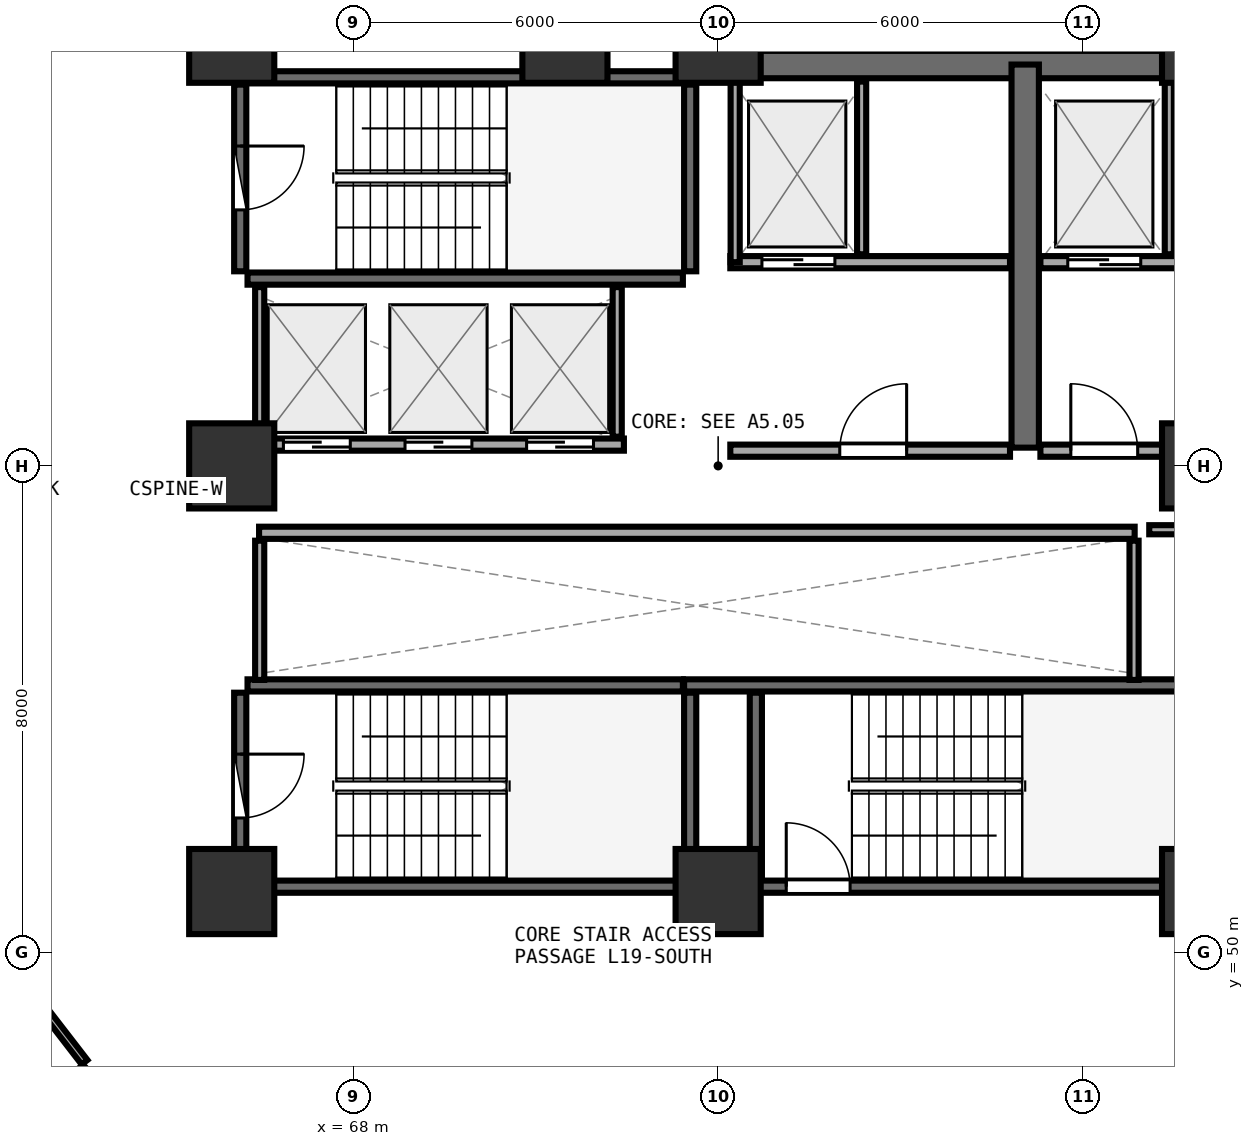
"""IFC4 building model, lengths in metres.
Left out: names, types, materials, properties, quantities, classifications, styles, units other than length and angle.
Written with IfcOpenShell. Run it as: python <this file> out.ifc"""

import sys

from ifc_helpers import new_model, si_unit, direction, frame, frame_2d, origin, origin_2d, place, context, subcontext, project, spatial, rectangle, extrude, element, fill, save


model = new_model("IFC4")
c1 = context("Model", 3, precision=1e-05, world=origin(), true_north=direction((0.0, 1.0)))
c2 = subcontext(c1, "Body", "Model", "MODEL_VIEW")
j1 = project(units=[si_unit("LENGTHUNIT", "METRE"), si_unit("PLANEANGLEUNIT", "RADIAN")], contexts=[c1])
p1 = place(None, origin())
s1 = spatial("IfcSite", under=j1, at=p1, CompositionType="ELEMENT")
p2 = place(p1, origin())
s2 = spatial("IfcBuilding", under=s1, at=p2, CompositionType="ELEMENT")
p3 = place(p2, frame((0.0, 0.0, 76.35)))
s3 = spatial("IfcBuildingStorey", under=s2, at=p3, CompositionType="ELEMENT", Elevation=76.35)
for number, where, z_axis, x_axis in (
    (1, (66.0, 51.0, 0.0), (0.0, 0.0, 1.0), (1.0, 0.0, 0.0)),
    (2, (74.0, 51.0, 0.0), (0.0, 0.0, 1.0), (1.0, 0.0, 0.0)),
    (3, (82.0, 51.0, 0.0), (0.0, 0.0, 1.0), (1.0, 0.0, 0.0)),
    (4, (82.0, 58.0, 0.0), (0.0, 0.0, 1.0), (1.0, 0.0, 0.0)),
    (5, (82.0, 65.0, 0.0), (0.0, 0.0, 1.0), (1.0, 0.0, 0.0)),
    (6, (74.0, 65.0, 0.0), (0.0, 0.0, 1.0), (1.0, 0.0, 0.0)),
    (7, (71.48, 65.0, 0.0), (0.0, 0.0, 1.0), (1.0, 0.0, 0.0)),
    (8, (66.0, 65.0, 0.0), (0.0, 0.0, 1.0), (1.0, 0.0, 0.0)),
    (9, (66.0, 58.0, 0.0), (0.0, 0.0, 1.0), (1.0, 0.0, 0.0)),
):
    element("IfcColumn", number, at=place(p3, frame(where, z_axis=z_axis, x_axis=x_axis)), inside=s3, PredefinedType="PILASTER", context=c2, shape_type="SweptSolid", body=[
        extrude(rectangle(XDim=1.4, YDim=1.4, at=origin_2d()), origin(), (0.0, 0.0, 1.0), 3.75),
    ])
p4 = place(p3, frame((66.26, 61.08, 0.0), z_axis=(0.0, 0.0, 1.0), x_axis=(1.0, 0.0, 0.0)))
e10 = element("IfcWall", 10, at=p4, inside=s3, PredefinedType="SHEAR", context=c2, shape_type="SweptSolid", body=[
    extrude(rectangle(XDim=7.16, YDim=0.2, at=frame_2d((3.58, 0.0))), origin(), (0.0, 0.0, 1.0), 3.49),
])
p5 = place(p3, frame((73.54, 61.2, 0.0), z_axis=(0.0, 0.0, 1.0), x_axis=(0.0, 1.0, 0.0)))
e11 = element("IfcWall", 11, at=p5, inside=s3, PredefinedType="SHEAR", context=c2, shape_type="SweptSolid", body=[
    extrude(rectangle(XDim=3.07, YDim=0.2, at=frame_2d((1.535, 0.0))), origin(), (0.0, 0.0, 1.0), 3.49),
])
p6 = place(p3, frame((73.42, 64.39, 0.0), z_axis=(0.0, 0.0, 1.0), x_axis=(-1.0, 0.0, 0.0)))
e12 = element("IfcWall", 12, at=p6, inside=s3, PredefinedType="SHEAR", context=c2, shape_type="SweptSolid", body=[
    extrude(rectangle(XDim=7.16, YDim=0.2, at=frame_2d((3.58, 0.0))), origin(), (0.0, 0.0, 1.0), 3.49),
])
p7 = place(p3, frame((66.14, 64.27, 0.0), z_axis=(0.0, 0.0, 1.0), x_axis=(0.0, -1.0, 0.0)))
e13 = element("IfcWall", 13, at=p7, inside=s3, PredefinedType="SHEAR", context=c2, shape_type="SweptSolid", body=[
    extrude(rectangle(XDim=3.07, YDim=0.2, at=frame_2d((1.535, 0.0))), origin(), (0.0, 0.0, 1.0), 3.49),
])
p8 = place(p7, frame((1.01, 0.0, 0.0)))
e14 = element("IfcOpeningElement", 14, at=p8, cuts=e13, PredefinedType="OPENING", context=c2, shape_type="SweptSolid", body=[
    extrude(rectangle(XDim=1.05, YDim=2.1, at=frame_2d((0.525, 1.05))), frame((0.0, 0.11, 0.0), z_axis=(0.0, -1.0, 0.0), x_axis=(1.0, 0.0, 0.0)), (0.0, 0.0, 1.0), 0.22),
])
p9 = place(p3, frame((74.0, 51.08, 0.0), z_axis=(0.0, 0.0, 1.0), x_axis=(1.0, 0.0, 0.0)))
e15 = element("IfcWall", 15, at=p9, inside=s3, PredefinedType="SHEAR", context=c2, shape_type="SweptSolid", body=[
    extrude(rectangle(XDim=7.9, YDim=0.2, at=frame_2d((3.95, 0.0))), origin(), (0.0, 0.0, 1.0), 3.49),
])
p10 = place(p9, frame((1.12, 0.0, 0.0)))
e16 = element("IfcOpeningElement", 16, at=p10, cuts=e15, PredefinedType="OPENING", context=c2, shape_type="SweptSolid", body=[
    extrude(rectangle(XDim=1.05, YDim=2.1, at=frame_2d((0.525, 1.05))), frame((0.0, 0.11, 0.0), z_axis=(0.0, -1.0, 0.0), x_axis=(1.0, 0.0, 0.0)), (0.0, 0.0, 1.0), 0.22),
])
p11 = place(p3, frame((81.9, 54.39, 0.0), z_axis=(0.0, 0.0, 1.0), x_axis=(-1.0, 0.0, 0.0)))
e17 = element("IfcWall", 17, at=p11, inside=s3, PredefinedType="SHEAR", context=c2, shape_type="SweptSolid", body=[
    extrude(rectangle(XDim=8.46, YDim=0.2, at=frame_2d((4.23, 0.0))), origin(), (0.0, 0.0, 1.0), 3.49),
])
p12 = place(p3, frame((74.62, 54.27, 0.0), z_axis=(0.0, 0.0, 1.0), x_axis=(0.0, -1.0, 0.0)))
e18 = element("IfcWall", 18, at=p12, inside=s3, PredefinedType="SHEAR", context=c2, shape_type="SweptSolid", body=[
    extrude(rectangle(XDim=3.07, YDim=0.2, at=frame_2d((1.535, 0.0))), origin(), (0.0, 0.0, 1.0), 3.49),
])
p13 = place(p3, frame((66.26, 51.08, 0.0), z_axis=(0.0, 0.0, 1.0), x_axis=(1.0, 0.0, 0.0)))
e19 = element("IfcWall", 19, at=p13, inside=s3, PredefinedType="SHEAR", context=c2, shape_type="SweptSolid", body=[
    extrude(rectangle(XDim=7.16, YDim=0.2, at=frame_2d((3.58, 0.0))), origin(), (0.0, 0.0, 1.0), 3.49),
])
p14 = place(p3, frame((73.54, 51.2, 0.0), z_axis=(0.0, 0.0, 1.0), x_axis=(0.0, 1.0, 0.0)))
e20 = element("IfcWall", 20, at=p14, inside=s3, PredefinedType="SHEAR", context=c2, shape_type="SweptSolid", body=[
    extrude(rectangle(XDim=3.07, YDim=0.2, at=frame_2d((1.535, 0.0))), origin(), (0.0, 0.0, 1.0), 3.49),
])
p15 = place(p3, frame((73.42, 54.39, 0.0), z_axis=(0.0, 0.0, 1.0), x_axis=(-1.0, 0.0, 0.0)))
e21 = element("IfcWall", 21, at=p15, inside=s3, PredefinedType="SHEAR", context=c2, shape_type="SweptSolid", body=[
    extrude(rectangle(XDim=7.16, YDim=0.2, at=frame_2d((3.58, 0.0))), origin(), (0.0, 0.0, 1.0), 3.49),
])
p16 = place(p3, frame((66.14, 54.27, 0.0), z_axis=(0.0, 0.0, 1.0), x_axis=(0.0, -1.0, 0.0)))
e22 = element("IfcWall", 22, at=p16, inside=s3, PredefinedType="SHEAR", context=c2, shape_type="SweptSolid", body=[
    extrude(rectangle(XDim=3.07, YDim=0.2, at=frame_2d((1.535, 0.0))), origin(), (0.0, 0.0, 1.0), 3.49),
])
p17 = place(p16, frame((1.01, 0.0, 0.0)))
e23 = element("IfcOpeningElement", 23, at=p17, cuts=e22, PredefinedType="OPENING", context=c2, shape_type="SweptSolid", body=[
    extrude(rectangle(XDim=1.05, YDim=2.1, at=frame_2d((0.525, 1.05))), frame((0.0, 0.11, 0.0), z_axis=(0.0, -1.0, 0.0), x_axis=(1.0, 0.0, 0.0)), (0.0, 0.0, 1.0), 0.22),
])
p18 = place(p3, frame((74.0, 64.6, 0.0), z_axis=(0.0, 0.0, 1.0), x_axis=(1.0, 0.0, 0.0)))
e24 = element("IfcWall", 24, at=p18, inside=s3, PredefinedType="SHEAR", context=c2, shape_type="SweptSolid", body=[
    extrude(rectangle(XDim=8.0, YDim=0.45, at=frame_2d((4.0, 0.0))), origin(), (0.0, 0.0, 1.0), 3.49),
])
p19 = place(p3, frame((79.05, 58.3, 0.0), z_axis=(0.0, 0.0, 1.0), x_axis=(0.0, 1.0, 0.0)))
e25 = element("IfcWall", 25, at=p19, inside=s3, PredefinedType="SHEAR", context=c2, shape_type="SweptSolid", body=[
    extrude(rectangle(XDim=6.3, YDim=0.45, at=frame_2d((3.15, 0.0))), origin(), (0.0, 0.0, 1.0), 3.49),
])
p20 = place(p3, frame((74.2, 61.35, 0.0), z_axis=(0.0, 0.0, 1.0), x_axis=(1.0, 0.0, 0.0)))
e26 = element("IfcWall", 26, at=p20, inside=s3, PredefinedType="SOLIDWALL", context=c2, shape_type="SweptSolid", body=[
    extrude(rectangle(XDim=4.6, YDim=0.2, at=frame_2d((2.3, 0.0))), origin(), (0.0, 0.0, 1.0), 3.48),
])
p21 = place(p20, frame((0.52, 0.0, 0.0)))
e27 = element("IfcOpeningElement", 27, at=p21, cuts=e26, PredefinedType="OPENING", context=c2, shape_type="SweptSolid", body=[
    extrude(rectangle(XDim=1.2, YDim=2.15, at=frame_2d((0.6, 1.075))), frame((0.0, 0.11, 0.0), z_axis=(0.0, -1.0, 0.0), x_axis=(1.0, 0.0, 0.0)), (0.0, 0.0, 1.0), 0.22),
])
p22 = place(p3, frame((74.28, 61.35, 0.0), z_axis=(0.0, 0.0, 1.0), x_axis=(0.0, 1.0, 0.0)))
e28 = element("IfcWall", 28, at=p22, inside=s3, PredefinedType="PARTITIONING", context=c2, shape_type="SweptSolid", body=[
    extrude(rectangle(XDim=2.97, YDim=0.15, at=frame_2d((1.485, 0.0))), origin(), (0.0, 0.0, 1.0), 3.48),
])
p23 = place(p3, frame((76.36, 61.48, 0.0), z_axis=(0.0, 0.0, 1.0), x_axis=(0.0, 1.0, 0.0)))
e29 = element("IfcWall", 29, at=p23, inside=s3, PredefinedType="PARTITIONING", context=c2, shape_type="SweptSolid", body=[
    extrude(rectangle(XDim=2.84, YDim=0.15, at=frame_2d((1.42, 0.0))), origin(), (0.0, 0.0, 1.0), 3.48),
])
p24 = place(p3, frame((79.3, 61.35, 0.0), z_axis=(0.0, 0.0, 1.0), x_axis=(1.0, 0.0, 0.0)))
e30 = element("IfcWall", 30, at=p24, inside=s3, PredefinedType="SOLIDWALL", context=c2, shape_type="SweptSolid", body=[
    extrude(rectangle(XDim=4.0, YDim=0.2, at=frame_2d((2.0, 0.0))), origin(), (0.0, 0.0, 1.0), 2.775),
])
p25 = place(p24, frame((0.45, 0.0, 0.0)))
e31 = element("IfcOpeningElement", 31, at=p25, cuts=e30, PredefinedType="OPENING", context=c2, shape_type="SweptSolid", body=[
    extrude(rectangle(XDim=1.2, YDim=2.15, at=frame_2d((0.6, 1.075))), frame((0.0, 0.11, 0.0), z_axis=(0.0, -1.0, 0.0), x_axis=(1.0, 0.0, 0.0)), (0.0, 0.0, 1.0), 0.22),
])
p26 = place(p3, frame((81.42, 61.48, 0.0), z_axis=(0.0, 0.0, 1.0), x_axis=(0.0, 1.0, 0.0)))
e32 = element("IfcWall", 32, at=p26, inside=s3, PredefinedType="PARTITIONING", context=c2, shape_type="SweptSolid", body=[
    extrude(rectangle(XDim=2.84, YDim=0.15, at=frame_2d((1.42, 0.0))), origin(), (0.0, 0.0, 1.0), 3.48),
])
p27 = place(p3, frame((74.2, 58.25, 0.0), z_axis=(0.0, 0.0, 1.0), x_axis=(1.0, 0.0, 0.0)))
e33 = element("IfcWall", 33, at=p27, inside=s3, PredefinedType="SOLIDWALL", context=c2, shape_type="SweptSolid", body=[
    extrude(rectangle(XDim=4.6, YDim=0.2, at=frame_2d((2.3, 0.0))), origin(), (0.0, 0.0, 1.0), 3.48),
])
p28 = place(p27, frame((1.8, 0.0, 0.0)))
e34 = element("IfcOpeningElement", 34, at=p28, cuts=e33, PredefinedType="OPENING", context=c2, shape_type="SweptSolid", body=[
    extrude(rectangle(XDim=1.1, YDim=2.1, at=frame_2d((0.55, 1.05))), frame((0.0, 0.11, 0.0), z_axis=(0.0, -1.0, 0.0), x_axis=(1.0, 0.0, 0.0)), (0.0, 0.0, 1.0), 0.22),
])
p29 = place(p3, frame((79.3, 58.25, 0.0), z_axis=(0.0, 0.0, 1.0), x_axis=(1.0, 0.0, 0.0)))
e35 = element("IfcWall", 35, at=p29, inside=s3, PredefinedType="SOLIDWALL", context=c2, shape_type="SweptSolid", body=[
    extrude(rectangle(XDim=4.0, YDim=0.2, at=frame_2d((2.0, 0.0))), origin(), (0.0, 0.0, 1.0), 2.775),
])
p30 = place(p29, frame((0.5, 0.0, 0.0)))
e36 = element("IfcOpeningElement", 36, at=p30, cuts=e35, PredefinedType="OPENING", context=c2, shape_type="SweptSolid", body=[
    extrude(rectangle(XDim=1.1, YDim=2.1, at=frame_2d((0.55, 1.05))), frame((0.0, 0.11, 0.0), z_axis=(0.0, -1.0, 0.0), x_axis=(1.0, 0.0, 0.0)), (0.0, 0.0, 1.0), 0.22),
])
p31 = place(p3, frame((66.45, 58.35, 0.0), z_axis=(0.0, 0.0, 1.0), x_axis=(1.0, 0.0, 0.0)))
e37 = element("IfcWall", 37, at=p31, inside=s3, PredefinedType="SOLIDWALL", context=c2, shape_type="SweptSolid", body=[
    extrude(rectangle(XDim=6.0, YDim=0.2, at=frame_2d((3.0, 0.0))), origin(), (0.0, 0.0, 1.0), 3.48),
])
p32 = place(p31, frame((0.4, 0.0, 0.0)))
e38 = element("IfcOpeningElement", 38, at=p32, cuts=e37, PredefinedType="OPENING", context=c2, shape_type="SweptSolid", body=[
    extrude(rectangle(XDim=1.1, YDim=2.1, at=frame_2d((0.55, 1.05))), frame((0.0, 0.11, 0.0), z_axis=(0.0, -1.0, 0.0), x_axis=(1.0, 0.0, 0.0)), (0.0, 0.0, 1.0), 0.22),
])
p33 = place(p31, frame((2.4, 0.0, 0.0)))
e39 = element("IfcOpeningElement", 39, at=p33, cuts=e37, PredefinedType="OPENING", context=c2, shape_type="SweptSolid", body=[
    extrude(rectangle(XDim=1.1, YDim=2.1, at=frame_2d((0.55, 1.05))), frame((0.0, 0.11, 0.0), z_axis=(0.0, -1.0, 0.0), x_axis=(1.0, 0.0, 0.0)), (0.0, 0.0, 1.0), 0.22),
])
p34 = place(p31, frame((4.4, 0.0, 0.0)))
e40 = element("IfcOpeningElement", 40, at=p34, cuts=e37, PredefinedType="OPENING", context=c2, shape_type="SweptSolid", body=[
    extrude(rectangle(XDim=1.1, YDim=2.1, at=frame_2d((0.55, 1.05))), frame((0.0, 0.11, 0.0), z_axis=(0.0, -1.0, 0.0), x_axis=(1.0, 0.0, 0.0)), (0.0, 0.0, 1.0), 0.22),
])
for number, where, z_axis, x_axis in (
    (41, (66.46, 58.48, 0.0), (0.0, 0.0, 1.0), (0.0, 1.0, 0.0)),
    (42, (72.34, 58.48, 0.0), (0.0, 0.0, 1.0), (0.0, 1.0, 0.0)),
):
    element("IfcWall", number, at=place(p3, frame(where, z_axis=z_axis, x_axis=x_axis)), inside=s3, PredefinedType="PARTITIONING", context=c2, shape_type="SweptSolid", body=[
        extrude(rectangle(XDim=2.46, YDim=0.15, at=frame_2d((1.23, 0.0))), origin(), (0.0, 0.0, 1.0), 3.48),
    ])
p35 = place(p3, frame((66.45, 56.9, 0.0), z_axis=(0.0, 0.0, 1.0), x_axis=(1.0, 0.0, 0.0)))
e43 = element("IfcWall", 43, at=p35, inside=s3, PredefinedType="SOLIDWALL", context=c2, shape_type="SweptSolid", body=[
    extrude(rectangle(XDim=14.4, YDim=0.2, at=frame_2d((7.2, 0.0))), origin(), (0.0, 0.0, 1.0), 3.48),
])
for number, where, z_axis, x_axis in (
    (44, (66.46, 54.48, 0.0), (0.0, 0.0, 1.0), (0.0, 1.0, 0.0)),
    (45, (80.84, 54.48, 0.0), (0.0, 0.0, 1.0), (0.0, 1.0, 0.0)),
):
    element("IfcWall", number, at=place(p3, frame(where, z_axis=z_axis, x_axis=x_axis)), inside=s3, PredefinedType="PARTITIONING", context=c2, shape_type="SweptSolid", body=[
        extrude(rectangle(XDim=2.29, YDim=0.15, at=frame_2d((1.145, 0.0))), origin(), (0.0, 0.0, 1.0), 3.48),
    ])
p36 = place(p3, frame((63.964, 68.131, 0.0), z_axis=(0.0, 0.0, 1.0), x_axis=(-0.639104047727, -0.769120287198, 0.0)))
e46 = element("IfcWall", 46, at=p36, inside=s3, PredefinedType="PARTITIONING", context=c2, shape_type="SweptSolid", body=[
    extrude(rectangle(XDim=5.427, YDim=0.12, at=frame_2d((2.713, 0.0))), origin(), (0.0, 0.0, 1.0), 2.925),
])
p37 = place(p36, frame((2.263, 0.0, 0.0)))
e47 = element("IfcOpeningElement", 47, at=p37, cuts=e46, PredefinedType="OPENING", context=c2, shape_type="SweptSolid", body=[
    extrude(rectangle(XDim=0.9, YDim=2.08, at=frame_2d((0.45, 1.04))), frame((0.0, 0.07, 0.0), z_axis=(0.0, -1.0, 0.0), x_axis=(1.0, 0.0, 0.0)), (0.0, 0.0, 1.0), 0.14),
])
p38 = place(p3, frame((60.275, 52.473, 0.0), z_axis=(0.0, 0.0, 1.0), x_axis=(0.611167326409, -0.791501420801, 0.0)))
e48 = element("IfcWall", 48, at=p38, inside=s3, PredefinedType="PARTITIONING", context=c2, shape_type="SweptSolid", body=[
    extrude(rectangle(XDim=5.407, YDim=0.12, at=frame_2d((2.704, 0.0))), origin(), (0.0, 0.0, 1.0), 2.925),
])
p39 = place(p38, frame((2.254, 0.0, 0.0)))
e49 = element("IfcOpeningElement", 49, at=p39, cuts=e48, PredefinedType="OPENING", context=c2, shape_type="SweptSolid", body=[
    extrude(rectangle(XDim=0.9, YDim=2.08, at=frame_2d((0.45, 1.04))), frame((0.0, 0.07, 0.0), z_axis=(0.0, -1.0, 0.0), x_axis=(1.0, 0.0, 0.0)), (0.0, 0.0, 1.0), 0.14),
])
p40 = place(p3, frame((81.494, 46.198, 0.0), z_axis=(0.0, 0.0, 1.0), x_axis=(0.785315722545, 0.619095482074, 0.0)))
e50 = element("IfcWall", 50, at=p40, inside=s3, PredefinedType="PARTITIONING", context=c2, shape_type="SweptSolid", body=[
    extrude(rectangle(XDim=5.54, YDim=0.12, at=frame_2d((2.77, 0.0))), origin(), (0.0, 0.0, 1.0), 2.925),
])
p41 = place(p40, frame((2.32, 0.0, 0.0)))
e51 = element("IfcOpeningElement", 51, at=p41, cuts=e50, PredefinedType="OPENING", context=c2, shape_type="SweptSolid", body=[
    extrude(rectangle(XDim=0.9, YDim=2.08, at=frame_2d((0.45, 1.04))), frame((0.0, 0.07, 0.0), z_axis=(0.0, -1.0, 0.0), x_axis=(1.0, 0.0, 0.0)), (0.0, 0.0, 1.0), 0.14),
])
p42 = place(p3, frame((82.64, 56.95, 0.0), z_axis=(0.0, 0.0, 1.0), x_axis=(-1.0, 0.0, 0.0)))
e52 = element("IfcWall", 52, at=p42, inside=s3, PredefinedType="PARTITIONING", context=c2, shape_type="SweptSolid", body=[
    extrude(rectangle(XDim=1.55, YDim=0.15, at=frame_2d((0.775, 0.0))), origin(), (0.0, 0.0, 1.0), 2.775),
])
p43 = place(p3, frame((63.587, 48.119, 0.0), z_axis=(0.0, 0.0, 1.0), x_axis=(-0.735387084409, -0.677647279995, 0.0)))
e53 = element("IfcWall", 53, at=p43, inside=s3, PredefinedType="PARTITIONING", context=c2, shape_type="SweptSolid", body=[
    extrude(rectangle(XDim=9.361, YDim=0.1, at=frame_2d((4.681, 0.0))), origin(), (0.0, 0.0, 1.0), 2.975),
])
p44 = place(p8, origin())
e54 = element("IfcDoor", 54, at=p44, inside=s3, OperationType="SINGLE_SWING_LEFT", PredefinedType="DOOR", context=c2, shape_type="SweptSolid", body=[
    extrude(rectangle(XDim=1.05, YDim=2.1, at=frame_2d((0.525, 1.05))), frame((0.0, 0.025, 0.0), z_axis=(0.0, -1.0, 0.0), x_axis=(1.0, 0.0, 0.0)), (0.0, 0.0, 1.0), 0.05),
])
fill(e14, e54)
p45 = place(p10, origin())
e55 = element("IfcDoor", 55, at=p45, inside=s3, OperationType="SINGLE_SWING_LEFT", PredefinedType="DOOR", context=c2, shape_type="SweptSolid", body=[
    extrude(rectangle(XDim=1.05, YDim=2.1, at=frame_2d((0.525, 1.05))), frame((0.0, 0.025, 0.0), z_axis=(0.0, -1.0, 0.0), x_axis=(1.0, 0.0, 0.0)), (0.0, 0.0, 1.0), 0.05),
])
fill(e16, e55)
p46 = place(p17, origin())
e56 = element("IfcDoor", 56, at=p46, inside=s3, OperationType="SINGLE_SWING_LEFT", PredefinedType="DOOR", context=c2, shape_type="SweptSolid", body=[
    extrude(rectangle(XDim=1.05, YDim=2.1, at=frame_2d((0.525, 1.05))), frame((0.0, 0.025, 0.0), z_axis=(0.0, -1.0, 0.0), x_axis=(1.0, 0.0, 0.0)), (0.0, 0.0, 1.0), 0.05),
])
fill(e23, e56)
p47 = place(p21, origin())
e57 = element("IfcDoor", 57, at=p47, inside=s3, OperationType="DOUBLE_DOOR_SLIDING", PredefinedType="DOOR", context=c2, shape_type="SweptSolid", body=[
    extrude(rectangle(XDim=1.2, YDim=2.15, at=frame_2d((0.6, 1.075))), frame((0.0, 0.025, 0.0), z_axis=(0.0, -1.0, 0.0), x_axis=(1.0, 0.0, 0.0)), (0.0, 0.0, 1.0), 0.05),
])
fill(e27, e57)
p48 = place(p25, origin())
e58 = element("IfcDoor", 58, at=p48, inside=s3, OperationType="DOUBLE_DOOR_SLIDING", PredefinedType="DOOR", context=c2, shape_type="SweptSolid", body=[
    extrude(rectangle(XDim=1.2, YDim=2.15, at=frame_2d((0.6, 1.075))), frame((0.0, 0.025, 0.0), z_axis=(0.0, -1.0, 0.0), x_axis=(1.0, 0.0, 0.0)), (0.0, 0.0, 1.0), 0.05),
])
fill(e31, e58)
p49 = place(p28, frame((1.1, 0.0, 0.0), z_axis=(0.0, 0.0, 1.0), x_axis=(-1.0, 0.0, 0.0)))
e59 = element("IfcDoor", 59, at=p49, inside=s3, OperationType="SINGLE_SWING_LEFT", PredefinedType="DOOR", context=c2, shape_type="SweptSolid", body=[
    extrude(rectangle(XDim=1.1, YDim=2.1, at=frame_2d((0.55, 1.05))), frame((0.0, 0.025, 0.0), z_axis=(0.0, -1.0, 0.0), x_axis=(1.0, 0.0, 0.0)), (0.0, 0.0, 1.0), 0.05),
])
fill(e34, e59)
p50 = place(p30, frame((1.1, 0.0, 0.0), z_axis=(0.0, 0.0, 1.0), x_axis=(-1.0, 0.0, 0.0)))
e60 = element("IfcDoor", 60, at=p50, inside=s3, OperationType="SINGLE_SWING_RIGHT", PredefinedType="DOOR", context=c2, shape_type="SweptSolid", body=[
    extrude(rectangle(XDim=1.1, YDim=2.1, at=frame_2d((0.55, 1.05))), frame((0.0, 0.025, 0.0), z_axis=(0.0, -1.0, 0.0), x_axis=(1.0, 0.0, 0.0)), (0.0, 0.0, 1.0), 0.05),
])
fill(e36, e60)
p51 = place(p32, origin())
e61 = element("IfcDoor", 61, at=p51, inside=s3, OperationType="DOUBLE_DOOR_SLIDING", PredefinedType="DOOR", context=c2, shape_type="SweptSolid", body=[
    extrude(rectangle(XDim=1.1, YDim=2.1, at=frame_2d((0.55, 1.05))), frame((0.0, 0.025, 0.0), z_axis=(0.0, -1.0, 0.0), x_axis=(1.0, 0.0, 0.0)), (0.0, 0.0, 1.0), 0.05),
])
fill(e38, e61)
p52 = place(p33, origin())
e62 = element("IfcDoor", 62, at=p52, inside=s3, OperationType="DOUBLE_DOOR_SLIDING", PredefinedType="DOOR", context=c2, shape_type="SweptSolid", body=[
    extrude(rectangle(XDim=1.1, YDim=2.1, at=frame_2d((0.55, 1.05))), frame((0.0, 0.025, 0.0), z_axis=(0.0, -1.0, 0.0), x_axis=(1.0, 0.0, 0.0)), (0.0, 0.0, 1.0), 0.05),
])
fill(e39, e62)
p53 = place(p34, origin())
e63 = element("IfcDoor", 63, at=p53, inside=s3, OperationType="DOUBLE_DOOR_SLIDING", PredefinedType="DOOR", context=c2, shape_type="SweptSolid", body=[
    extrude(rectangle(XDim=1.1, YDim=2.1, at=frame_2d((0.55, 1.05))), frame((0.0, 0.025, 0.0), z_axis=(0.0, -1.0, 0.0), x_axis=(1.0, 0.0, 0.0)), (0.0, 0.0, 1.0), 0.05),
])
fill(e40, e63)
save(model, sys.argv[1])
